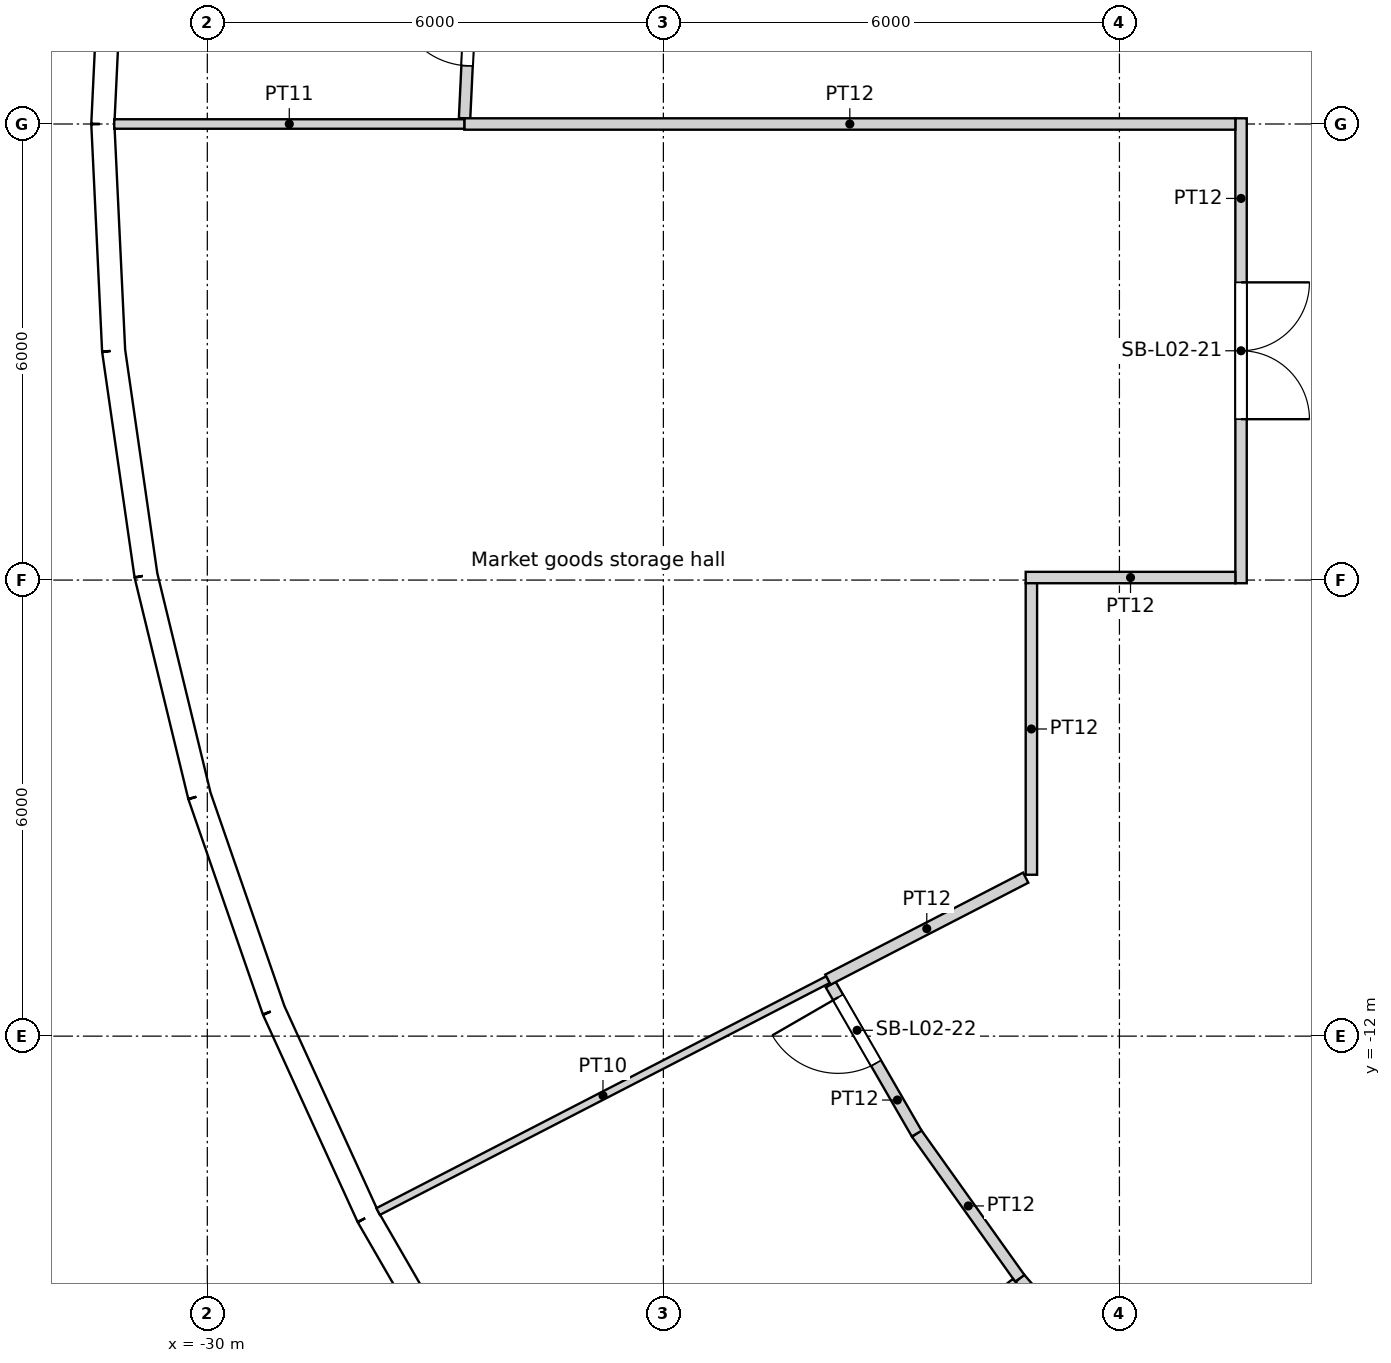
"""IFC4 building model, lengths in metres.
Left out: names, types, materials, properties, quantities, classifications, styles, units other than length and angle.
Written with IfcOpenShell. Run it as: python <this file> out.ifc"""

import sys

from ifc_helpers import new_model, si_unit, direction, frame, frame_2d, origin, origin_2d, place, context, subcontext, project, spatial, rectangle, circle, extrude, element, fill, save


model = new_model("IFC4")
c1 = context("Model", 3, precision=1e-05, world=origin(), true_north=direction((0.0, 1.0)))
c2 = subcontext(c1, "Body", "Model", "MODEL_VIEW")
j1 = project(units=[si_unit("LENGTHUNIT", "METRE"), si_unit("PLANEANGLEUNIT", "RADIAN")], contexts=[c1])
p1 = place(None, origin())
s1 = spatial("IfcSite", under=j1, at=p1, CompositionType="ELEMENT")
p2 = place(p1, origin())
s2 = spatial("IfcBuilding", under=s1, at=p2, CompositionType="ELEMENT")
p3 = place(p2, frame((0.0, 0.0, 13.8)))
s3 = spatial("IfcBuildingStorey", under=s2, at=p3, CompositionType="ELEMENT", Elevation=13.8)
for number, where, z_axis, x_axis in (
    (1, (-30.137, -2.878, 0.0), (0.0, 0.0, 1.0), (1.0, 0.0, 0.0)),
    (2, (-29.048, -8.529, 0.0), (0.0, 0.0, 1.0), (1.0, 0.0, 0.0)),
    (3, (-26.909, -13.873, 0.0), (0.0, 0.0, 1.0), (1.0, 0.0, 0.0)),
):
    element("IfcColumn", number, at=place(p3, frame(where, z_axis=z_axis, x_axis=x_axis)), inside=s3, PredefinedType="COLUMN", context=c2, shape_type="SweptSolid", body=[
        extrude(circle(Radius=0.7, at=origin_2d()), origin(), (0.0, 0.0, 1.0), 4.8),
    ])
for number, where, z_axis, x_axis in (
    (4, (-24.382, -2.85, 0.0), (0.0, 0.0, 1.0), (1.0, 0.0, 0.0)),
    (5, (-23.067, -8.396, 0.0), (0.0, 0.0, 1.0), (1.0, 0.0, 0.0)),
    (6, (-20.509, -13.489, 0.0), (0.0, 0.0, 1.0), (1.0, 0.0, 0.0)),
):
    element("IfcColumn", number, at=place(p3, frame(where, z_axis=z_axis, x_axis=x_axis)), inside=s3, PredefinedType="COLUMN", context=c2, shape_type="SweptSolid", body=[
        extrude(circle(Radius=0.75, at=origin_2d()), origin(), (0.0, 0.0, 1.0), 4.8),
    ])
for number, where, z_axis, x_axis in (
    (7, (-18.612, -2.805, 0.0), (0.0, 0.0, 1.0), (1.0, 0.0, 0.0)),
    (8, (-16.958, -8.167, 0.0), (0.0, 0.0, 1.0), (1.0, 0.0, 0.0)),
):
    element("IfcColumn", number, at=place(p3, frame(where, z_axis=z_axis, x_axis=x_axis)), inside=s3, PredefinedType="COLUMN", context=c2, shape_type="SweptSolid", body=[
        extrude(circle(Radius=0.8, at=origin_2d()), origin(), (0.0, 0.0, 1.0), 4.8),
    ])
p4 = place(p3, frame((-31.232, 2.982, 0.0), z_axis=(0.0, 0.0, 1.0), x_axis=(-0.047588458579, -0.998867027492, 0.0)))
e9 = element("IfcWall", 9, at=p4, inside=s3, PredefinedType="SOLIDWALL", context=c2, shape_type="SweptSolid", body=[
    extrude(rectangle(XDim=2.986, YDim=0.3, at=frame_2d((1.493, 0.0))), origin(), (0.0, 0.0, 1.0), 4.35),
])
p5 = place(p4, frame((1.493, 0.0, 2.0)))
e10 = element("IfcOpeningElement", 10, at=p5, cuts=e9, PredefinedType="OPENING", context=c2, shape_type="SweptSolid", body=[
    extrude(circle(Radius=1.2, at=origin_2d()), frame((0.0, 0.16, 0.0), z_axis=(0.0, -1.0, 0.0), x_axis=(1.0, 0.0, 0.0)), (0.0, 0.0, 1.0), 0.32),
])
p6 = place(p3, frame((-31.375, 0.0, 0.0), z_axis=(0.0, 0.0, 1.0), x_axis=(0.047588458579, -0.998867027492, 0.0)))
e11 = element("IfcWall", 11, at=p6, inside=s3, PredefinedType="SOLIDWALL", context=c2, shape_type="SweptSolid", body=[
    extrude(rectangle(XDim=2.986, YDim=0.3, at=frame_2d((1.493, 0.0))), origin(), (0.0, 0.0, 1.0), 4.35),
])
p7 = place(p6, frame((1.493, 0.0, 2.0)))
e12 = element("IfcOpeningElement", 12, at=p7, cuts=e11, PredefinedType="OPENING", context=c2, shape_type="SweptSolid", body=[
    extrude(circle(Radius=1.2, at=origin_2d()), frame((0.0, 0.16, 0.0), z_axis=(0.0, -1.0, 0.0), x_axis=(1.0, 0.0, 0.0)), (0.0, 0.0, 1.0), 0.32),
])
p8 = place(p3, frame((-31.232, -2.982, 0.0), z_axis=(0.0, 0.0, 1.0), x_axis=(0.142360001917, -0.989814947278, 0.0)))
e13 = element("IfcWall", 13, at=p8, inside=s3, PredefinedType="SOLIDWALL", context=c2, shape_type="SweptSolid", body=[
    extrude(rectangle(XDim=2.986, YDim=0.3, at=frame_2d((1.493, 0.0))), origin(), (0.0, 0.0, 1.0), 4.35),
])
p9 = place(p8, frame((1.493, 0.0, 2.0)))
e14 = element("IfcOpeningElement", 14, at=p9, cuts=e13, PredefinedType="OPENING", context=c2, shape_type="SweptSolid", body=[
    extrude(circle(Radius=1.2, at=origin_2d()), frame((0.0, 0.16, 0.0), z_axis=(0.0, -1.0, 0.0), x_axis=(1.0, 0.0, 0.0)), (0.0, 0.0, 1.0), 0.32),
])
p10 = place(p3, frame((-30.807, -5.938, 0.0), z_axis=(0.0, 0.0, 1.0), x_axis=(0.235756834479, -0.971812078026, 0.0)))
e15 = element("IfcWall", 15, at=p10, inside=s3, PredefinedType="SOLIDWALL", context=c2, shape_type="SweptSolid", body=[
    extrude(rectangle(XDim=2.986, YDim=0.3, at=frame_2d((1.493, 0.0))), origin(), (0.0, 0.0, 1.0), 4.35),
])
p11 = place(p10, frame((1.493, 0.0, 2.0)))
e16 = element("IfcOpeningElement", 16, at=p11, cuts=e15, PredefinedType="OPENING", context=c2, shape_type="SweptSolid", body=[
    extrude(circle(Radius=1.2, at=origin_2d()), frame((0.0, 0.16, 0.0), z_axis=(0.0, -1.0, 0.0), x_axis=(1.0, 0.0, 0.0)), (0.0, 0.0, 1.0), 0.32),
])
p12 = place(p3, frame((-30.104, -8.839, 0.0), z_axis=(0.0, 0.0, 1.0), x_axis=(0.327074054052, -0.944998710669, 0.0)))
e17 = element("IfcWall", 17, at=p12, inside=s3, PredefinedType="SOLIDWALL", context=c2, shape_type="SweptSolid", body=[
    extrude(rectangle(XDim=2.986, YDim=0.3, at=frame_2d((1.493, 0.0))), origin(), (0.0, 0.0, 1.0), 4.35),
])
p13 = place(p12, frame((1.493, 0.0, 2.0)))
e18 = element("IfcOpeningElement", 18, at=p13, cuts=e17, PredefinedType="OPENING", context=c2, shape_type="SweptSolid", body=[
    extrude(circle(Radius=1.2, at=origin_2d()), frame((0.0, 0.16, 0.0), z_axis=(0.0, -1.0, 0.0), x_axis=(1.0, 0.0, 0.0)), (0.0, 0.0, 1.0), 0.32),
])
p14 = place(p3, frame((-29.127, -11.661, 0.0), z_axis=(0.0, 0.0, 1.0), x_axis=(0.415373250944, -0.909651066289, 0.0)))
e19 = element("IfcWall", 19, at=p14, inside=s3, PredefinedType="SOLIDWALL", context=c2, shape_type="SweptSolid", body=[
    extrude(rectangle(XDim=2.986, YDim=0.3, at=frame_2d((1.493, 0.0))), origin(), (0.0, 0.0, 1.0), 4.35),
])
p15 = place(p14, frame((1.493, 0.0, 2.0)))
e20 = element("IfcOpeningElement", 20, at=p15, cuts=e19, PredefinedType="OPENING", context=c2, shape_type="SweptSolid", body=[
    extrude(circle(Radius=1.2, at=origin_2d()), frame((0.0, 0.16, 0.0), z_axis=(0.0, -1.0, 0.0), x_axis=(1.0, 0.0, 0.0)), (0.0, 0.0, 1.0), 0.32),
])
p16 = place(p3, frame((-27.887, -14.377, 0.0), z_axis=(0.0, 0.0, 1.0), x_axis=(0.500017373705, -0.866015372839, 0.0)))
e21 = element("IfcWall", 21, at=p16, inside=s3, PredefinedType="SOLIDWALL", context=c2, shape_type="SweptSolid", body=[
    extrude(rectangle(XDim=2.986, YDim=0.3, at=frame_2d((1.493, 0.0))), origin(), (0.0, 0.0, 1.0), 4.35),
])
p17 = place(p16, frame((1.493, 0.0, 2.0)))
e22 = element("IfcOpeningElement", 22, at=p17, cuts=e21, PredefinedType="OPENING", context=c2, shape_type="SweptSolid", body=[
    extrude(circle(Radius=1.2, at=origin_2d()), frame((0.0, 0.16, 0.0), z_axis=(0.0, -1.0, 0.0), x_axis=(1.0, 0.0, 0.0)), (0.0, 0.0, 1.0), 0.32),
])
p18 = place(p3, frame((-31.224, 0.0, 0.0), z_axis=(0.0, 0.0, 1.0), x_axis=(1.0, 0.0, 0.0)))
e23 = element("IfcWall", 23, at=p18, inside=s3, PredefinedType="PARTITIONING", context=c2, shape_type="SweptSolid", body=[
    extrude(rectangle(XDim=4.605, YDim=0.125, at=frame_2d((2.303, 0.0))), origin(), (0.0, 0.0, 1.0), 3.75),
])
p19 = place(p3, frame((-27.753, -14.308, 0.0), z_axis=(0.0, 0.0, 1.0), x_axis=(0.888828839168, 0.458239342117, 0.0)))
e24 = element("IfcWall", 24, at=p19, inside=s3, PredefinedType="PARTITIONING", context=c2, shape_type="SweptSolid", body=[
    extrude(rectangle(XDim=6.658, YDim=0.1, at=frame_2d((3.329, 0.0))), origin(), (0.0, 0.0, 1.0), 3.75),
])
p20 = place(p3, frame((-26.619, 0.0, 0.0), z_axis=(0.0, 0.0, 1.0), x_axis=(1.0, 0.0, 0.0)))
e25 = element("IfcWall", 25, at=p20, inside=s3, PredefinedType="PARTITIONING", context=c2, shape_type="SweptSolid", body=[
    extrude(rectangle(XDim=10.144, YDim=0.15, at=frame_2d((5.072, 0.0))), origin(), (0.0, 0.0, 1.0), 3.75),
])
p21 = place(p3, frame((-26.615, 0.075, 0.0), z_axis=(0.0, 0.0, 1.0), x_axis=(0.047526384729, 0.998869982908, 0.0)))
e26 = element("IfcWall", 26, at=p21, inside=s3, PredefinedType="PARTITIONING", context=c2, shape_type="SweptSolid", body=[
    extrude(rectangle(XDim=2.394, YDim=0.15, at=frame_2d((1.197, 0.0))), origin(), (0.0, 0.0, 1.0), 3.75),
])
p22 = place(p21, frame((0.691, 0.0, 0.0)))
e27 = element("IfcOpeningElement", 27, at=p22, cuts=e26, PredefinedType="OPENING", context=c2, shape_type="SweptSolid", body=[
    extrude(rectangle(XDim=1.0, YDim=2.1, at=frame_2d((0.5, 1.05))), frame((0.0, 0.075, 0.0), z_axis=(0.0, -1.0, 0.0), x_axis=(1.0, 0.0, 0.0)), (0.0, 0.0, 1.0), 0.15),
])
p23 = place(p3, frame((-24.544, -19.302, 0.0), z_axis=(0.0, 0.0, 1.0), x_axis=(0.786055722677, 0.618155644515, 0.0)))
e28 = element("IfcWall", 28, at=p23, inside=s3, PredefinedType="PARTITIONING", context=c2, shape_type="SweptSolid", body=[
    extrude(rectangle(XDim=6.583, YDim=0.1, at=frame_2d((3.291, 0.0))), origin(), (0.0, 0.0, 1.0), 3.75),
])
p24 = place(p3, frame((-20.667, -13.282, 0.0), z_axis=(0.0, 0.0, 1.0), x_axis=(-0.500049307386, 0.86599693428, 0.0)))
e29 = element("IfcWall", 29, at=p24, inside=s3, PredefinedType="PARTITIONING", context=c2, shape_type="SweptSolid", body=[
    extrude(rectangle(XDim=2.263, YDim=0.15, at=frame_2d((1.131, 0.0))), origin(), (0.0, 0.0, 1.0), 3.75),
])
p25 = place(p24, frame((1.069, 0.0, 0.0)))
e30 = element("IfcOpeningElement", 30, at=p25, cuts=e29, PredefinedType="OPENING", context=c2, shape_type="SweptSolid", body=[
    extrude(rectangle(XDim=1.0, YDim=2.1, at=frame_2d((0.5, 1.05))), frame((0.0, 0.075, 0.0), z_axis=(0.0, -1.0, 0.0), x_axis=(1.0, 0.0, 0.0)), (0.0, 0.0, 1.0), 0.15),
])
p26 = place(p3, frame((-21.836, -11.257, 0.0), z_axis=(0.0, 0.0, 1.0), x_axis=(0.888822270684, 0.458252082522, 0.0)))
e31 = element("IfcWall", 31, at=p26, inside=s3, PredefinedType="PARTITIONING", context=c2, shape_type="SweptSolid", body=[
    extrude(rectangle(XDim=2.928, YDim=0.15, at=frame_2d((1.464, 0.0))), origin(), (0.0, 0.0, 1.0), 3.75),
])
p27 = place(p3, frame((-20.667, -13.282, 0.0), z_axis=(0.0, 0.0, 1.0), x_axis=(0.580032319147, -0.814593462252, 0.0)))
e32 = element("IfcWall", 32, at=p27, inside=s3, PredefinedType="PARTITIONING", context=c2, shape_type="SweptSolid", body=[
    extrude(rectangle(XDim=2.338, YDim=0.15, at=frame_2d((1.169, 0.0))), origin(), (0.0, 0.0, 1.0), 3.75),
])
p28 = place(p3, frame((-19.311, -15.186, 0.0), z_axis=(0.0, 0.0, 1.0), x_axis=(0.654866925236, -0.755744209526, 0.0)))
e33 = element("IfcWall", 33, at=p28, inside=s3, PredefinedType="PARTITIONING", context=c2, shape_type="SweptSolid", body=[
    extrude(rectangle(XDim=2.338, YDim=0.15, at=frame_2d((1.169, 0.0))), origin(), (0.0, 0.0, 1.0), 3.75),
])
p29 = place(p3, frame((-19.158, -6.042, 0.0), z_axis=(0.0, 0.0, 1.0), x_axis=(0.0, -1.0, 0.0)))
e34 = element("IfcWall", 34, at=p29, inside=s3, PredefinedType="PARTITIONING", context=c2, shape_type="SweptSolid", body=[
    extrude(rectangle(XDim=3.835, YDim=0.15, at=frame_2d((1.917, 0.0))), origin(), (0.0, 0.0, 1.0), 3.75),
])
p30 = place(p3, frame((-16.475, -5.967, 0.0), z_axis=(0.0, 0.0, 1.0), x_axis=(-1.0, 0.0, 0.0)))
e35 = element("IfcWall", 35, at=p30, inside=s3, PredefinedType="PARTITIONING", context=c2, shape_type="SweptSolid", body=[
    extrude(rectangle(XDim=2.758, YDim=0.15, at=frame_2d((1.379, 0.0))), origin(), (0.0, 0.0, 1.0), 3.75),
])
p31 = place(p3, frame((-16.4, -6.042, 0.0), z_axis=(0.0, 0.0, 1.0), x_axis=(0.0, 1.0, 0.0)))
e36 = element("IfcWall", 36, at=p31, inside=s3, PredefinedType="PARTITIONING", context=c2, shape_type="SweptSolid", body=[
    extrude(rectangle(XDim=6.117, YDim=0.15, at=frame_2d((3.058, 0.0))), origin(), (0.0, 0.0, 1.0), 3.75),
])
p32 = place(p31, frame((2.158, 0.0, 0.0)))
e37 = element("IfcOpeningElement", 37, at=p32, cuts=e36, PredefinedType="OPENING", context=c2, shape_type="SweptSolid", body=[
    extrude(rectangle(XDim=1.8, YDim=2.4, at=frame_2d((0.9, 1.2))), frame((0.0, 0.075, 0.0), z_axis=(0.0, -1.0, 0.0), x_axis=(1.0, 0.0, 0.0)), (0.0, 0.0, 1.0), 0.15),
])
p33 = place(p5, origin())
e38 = element("IfcWindow", 38, at=p33, inside=s3, PartitioningType="SINGLE_PANEL", PredefinedType="WINDOW", context=c2, shape_type="SweptSolid", body=[
    extrude(circle(Radius=1.2, at=origin_2d()), frame((0.0, 0.12, 0.0), z_axis=(0.0, -1.0, 0.0), x_axis=(1.0, 0.0, 0.0)), (0.0, 0.0, 1.0), 0.1),
])
fill(e10, e38)
p34 = place(p7, origin())
e39 = element("IfcWindow", 39, at=p34, inside=s3, PartitioningType="SINGLE_PANEL", PredefinedType="WINDOW", context=c2, shape_type="SweptSolid", body=[
    extrude(circle(Radius=1.2, at=origin_2d()), frame((0.0, 0.12, 0.0), z_axis=(0.0, -1.0, 0.0), x_axis=(1.0, 0.0, 0.0)), (0.0, 0.0, 1.0), 0.1),
])
fill(e12, e39)
p35 = place(p9, origin())
e40 = element("IfcWindow", 40, at=p35, inside=s3, PartitioningType="SINGLE_PANEL", PredefinedType="WINDOW", context=c2, shape_type="SweptSolid", body=[
    extrude(circle(Radius=1.2, at=origin_2d()), frame((0.0, 0.12, 0.0), z_axis=(0.0, -1.0, 0.0), x_axis=(1.0, 0.0, 0.0)), (0.0, 0.0, 1.0), 0.1),
])
fill(e14, e40)
p36 = place(p11, origin())
e41 = element("IfcWindow", 41, at=p36, inside=s3, PartitioningType="SINGLE_PANEL", PredefinedType="WINDOW", context=c2, shape_type="SweptSolid", body=[
    extrude(circle(Radius=1.2, at=origin_2d()), frame((0.0, 0.12, 0.0), z_axis=(0.0, -1.0, 0.0), x_axis=(1.0, 0.0, 0.0)), (0.0, 0.0, 1.0), 0.1),
])
fill(e16, e41)
p37 = place(p13, origin())
e42 = element("IfcWindow", 42, at=p37, inside=s3, PartitioningType="SINGLE_PANEL", PredefinedType="WINDOW", context=c2, shape_type="SweptSolid", body=[
    extrude(circle(Radius=1.2, at=origin_2d()), frame((0.0, 0.12, 0.0), z_axis=(0.0, -1.0, 0.0), x_axis=(1.0, 0.0, 0.0)), (0.0, 0.0, 1.0), 0.1),
])
fill(e18, e42)
p38 = place(p15, origin())
e43 = element("IfcWindow", 43, at=p38, inside=s3, PartitioningType="SINGLE_PANEL", PredefinedType="WINDOW", context=c2, shape_type="SweptSolid", body=[
    extrude(circle(Radius=1.2, at=origin_2d()), frame((0.0, 0.12, 0.0), z_axis=(0.0, -1.0, 0.0), x_axis=(1.0, 0.0, 0.0)), (0.0, 0.0, 1.0), 0.1),
])
fill(e20, e43)
p39 = place(p17, origin())
e44 = element("IfcWindow", 44, at=p39, inside=s3, PartitioningType="SINGLE_PANEL", PredefinedType="WINDOW", context=c2, shape_type="SweptSolid", body=[
    extrude(circle(Radius=1.2, at=origin_2d()), frame((0.0, 0.12, 0.0), z_axis=(0.0, -1.0, 0.0), x_axis=(1.0, 0.0, 0.0)), (0.0, 0.0, 1.0), 0.1),
])
fill(e22, e44)
p40 = place(p22, origin())
e45 = element("IfcDoor", 45, at=p40, inside=s3, OperationType="SINGLE_SWING_RIGHT", PredefinedType="DOOR", context=c2, shape_type="SweptSolid", body=[
    extrude(rectangle(XDim=1.0, YDim=2.1, at=frame_2d((0.5, 1.05))), frame((0.0, 0.025, 0.0), z_axis=(0.0, -1.0, 0.0), x_axis=(1.0, 0.0, 0.0)), (0.0, 0.0, 1.0), 0.05),
])
fill(e27, e45)
p41 = place(p32, origin())
e46 = element("IfcDoor", 46, at=p41, inside=s3, OperationType="DOUBLE_DOOR_SINGLE_SWING", PredefinedType="DOOR", context=c2, shape_type="SweptSolid", body=[
    extrude(rectangle(XDim=1.8, YDim=2.4, at=frame_2d((0.9, 1.2))), frame((0.0, 0.025, 0.0), z_axis=(0.0, -1.0, 0.0), x_axis=(1.0, 0.0, 0.0)), (0.0, 0.0, 1.0), 0.05),
])
fill(e37, e46)
p42 = place(p25, origin())
e47 = element("IfcDoor", 47, at=p42, inside=s3, OperationType="SINGLE_SWING_RIGHT", PredefinedType="DOOR", context=c2, shape_type="SweptSolid", body=[
    extrude(rectangle(XDim=1.0, YDim=2.1, at=frame_2d((0.5, 1.05))), frame((0.0, 0.025, 0.0), z_axis=(0.0, -1.0, 0.0), x_axis=(1.0, 0.0, 0.0)), (0.0, 0.0, 1.0), 0.05),
])
fill(e30, e47)
save(model, sys.argv[1])
